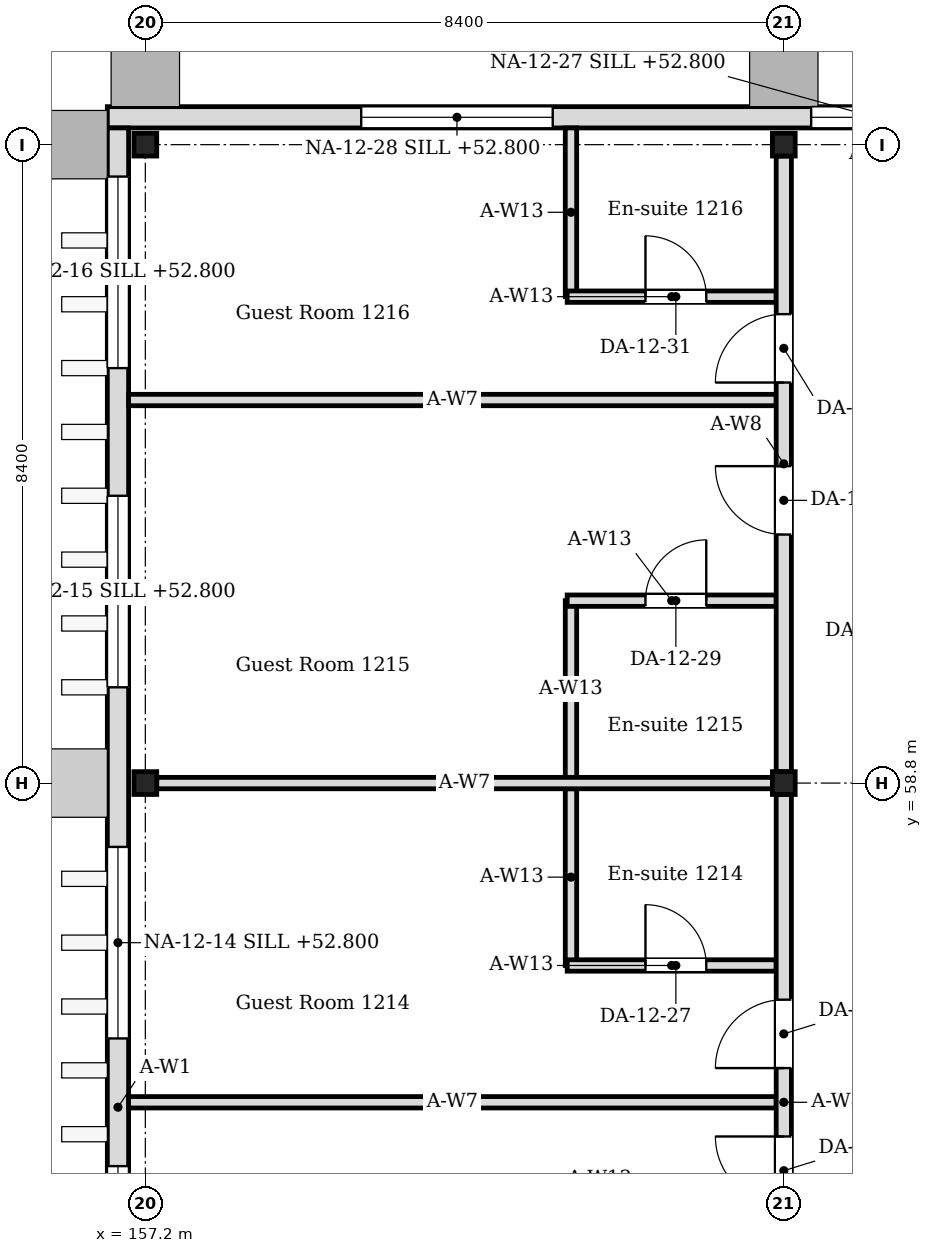
"""IFC4 building model, lengths in metres.
Left out: names, types, materials, properties, quantities, classifications, styles, units other than length and angle.
Written with IfcOpenShell. Run it as: python <this file> out.ifc"""

import sys

from ifc_helpers import new_model, si_unit, direction, frame, frame_2d, origin, origin_2d, place, context, subcontext, project, spatial, rectangle, i_section, extrude, element, fill, save


model = new_model("IFC4")
c1 = context("Model", 3, precision=1e-05, world=origin(), true_north=direction((0.0, 1.0)))
c2 = subcontext(c1, "Body", "Model", "MODEL_VIEW")
j1 = project(units=[si_unit("LENGTHUNIT", "METRE"), si_unit("PLANEANGLEUNIT", "RADIAN")], contexts=[c1])
p1 = place(None, origin())
s1 = spatial("IfcSite", under=j1, at=p1, CompositionType="ELEMENT")
p2 = place(p1, origin())
s2 = spatial("IfcBuilding", under=s1, at=p2, CompositionType="ELEMENT")
p3 = place(p2, frame((0.0, 0.0, 52.2)))
s3 = spatial("IfcBuildingStorey", under=s2, at=p3, CompositionType="ELEMENT", Elevation=52.2)
for number, where, z_axis, x_axis in (
    (1, (157.2, 58.8, 0.0), (0.0, 0.0, 1.0), (1.0, 0.0, 0.0)),
    (2, (157.2, 67.2, 0.0), (0.0, 0.0, 1.0), (1.0, 0.0, 0.0)),
    (3, (165.6, 58.8, 0.0), (0.0, 0.0, 1.0), (1.0, 0.0, 0.0)),
    (4, (165.6, 67.2, 0.0), (0.0, 0.0, 1.0), (1.0, 0.0, 0.0)),
):
    element("IfcColumn", number, at=place(p3, frame(where, z_axis=z_axis, x_axis=x_axis)), inside=s3, PredefinedType="COLUMN", context=c2, shape_type="SweptSolid", body=[
        extrude(i_section(OverallWidth=0.3, OverallDepth=0.3, WebThickness=0.01, FlangeThickness=0.015, FilletRadius=0.013, at=origin_2d()), origin(), (0.0, 0.0, 1.0), 4.2),
    ])
p4 = place(p3, frame((156.84, 41.65, 0.0), z_axis=(0.0, 0.0, 1.0), x_axis=(0.0, 1.0, 0.0)))
e5 = element("IfcWall", 5, at=p4, inside=s3, PredefinedType="SOLIDWALL", context=c2, shape_type="SweptSolid", body=[
    extrude(rectangle(XDim=25.77, YDim=0.28, at=frame_2d((12.885, 0.0))), origin(), (0.0, 0.0, 1.0), 4.05),
])
p5 = place(p4, frame((1.61, 0.0, 0.6)))
e6 = element("IfcOpeningElement", 6, at=p5, cuts=e5, PredefinedType="OPENING", context=c2, shape_type="SweptSolid", body=[
    extrude(rectangle(XDim=2.52, YDim=2.4, at=frame_2d((1.26, 1.2))), frame((0.0, 0.15, 0.0), z_axis=(0.0, -1.0, 0.0), x_axis=(1.0, 0.0, 0.0)), (0.0, 0.0, 1.0), 0.3),
])
p6 = place(p4, frame((5.81, 0.0, 0.6)))
e7 = element("IfcOpeningElement", 7, at=p6, cuts=e5, PredefinedType="OPENING", context=c2, shape_type="SweptSolid", body=[
    extrude(rectangle(XDim=2.52, YDim=2.4, at=frame_2d((1.26, 1.2))), frame((0.0, 0.15, 0.0), z_axis=(0.0, -1.0, 0.0), x_axis=(1.0, 0.0, 0.0)), (0.0, 0.0, 1.0), 0.3),
])
p7 = place(p4, frame((9.59, 0.0, 0.6)))
e8 = element("IfcOpeningElement", 8, at=p7, cuts=e5, PredefinedType="OPENING", context=c2, shape_type="SweptSolid", body=[
    extrude(rectangle(XDim=2.52, YDim=2.4, at=frame_2d((1.26, 1.2))), frame((0.0, 0.15, 0.0), z_axis=(0.0, -1.0, 0.0), x_axis=(1.0, 0.0, 0.0)), (0.0, 0.0, 1.0), 0.3),
])
p8 = place(p4, frame((13.79, 0.0, 0.6)))
e9 = element("IfcOpeningElement", 9, at=p8, cuts=e5, PredefinedType="OPENING", context=c2, shape_type="SweptSolid", body=[
    extrude(rectangle(XDim=2.52, YDim=2.4, at=frame_2d((1.26, 1.2))), frame((0.0, 0.15, 0.0), z_axis=(0.0, -1.0, 0.0), x_axis=(1.0, 0.0, 0.0)), (0.0, 0.0, 1.0), 0.3),
])
p9 = place(p4, frame((18.41, 0.0, 0.6)))
e10 = element("IfcOpeningElement", 10, at=p9, cuts=e5, PredefinedType="OPENING", context=c2, shape_type="SweptSolid", body=[
    extrude(rectangle(XDim=2.52, YDim=2.4, at=frame_2d((1.26, 1.2))), frame((0.0, 0.15, 0.0), z_axis=(0.0, -1.0, 0.0), x_axis=(1.0, 0.0, 0.0)), (0.0, 0.0, 1.0), 0.3),
])
p10 = place(p4, frame((22.61, 0.0, 0.6)))
e11 = element("IfcOpeningElement", 11, at=p10, cuts=e5, PredefinedType="OPENING", context=c2, shape_type="SweptSolid", body=[
    extrude(rectangle(XDim=2.52, YDim=2.4, at=frame_2d((1.26, 1.2))), frame((0.0, 0.15, 0.0), z_axis=(0.0, -1.0, 0.0), x_axis=(1.0, 0.0, 0.0)), (0.0, 0.0, 1.0), 0.3),
])
p11 = place(p3, frame((156.7, 67.56, 0.0), z_axis=(0.0, 0.0, 1.0), x_axis=(1.0, 0.0, 0.0)))
e12 = element("IfcWall", 12, at=p11, inside=s3, PredefinedType="SOLIDWALL", context=c2, shape_type="SweptSolid", body=[
    extrude(rectangle(XDim=20.2, YDim=0.28, at=frame_2d((10.1, 0.0))), origin(), (0.0, 0.0, 1.0), 4.05),
])
p12 = place(p11, frame((9.26, 0.0, 0.6)))
e13 = element("IfcOpeningElement", 13, at=p12, cuts=e12, PredefinedType="OPENING", context=c2, shape_type="SweptSolid", body=[
    extrude(rectangle(XDim=1.68, YDim=2.4, at=frame_2d((0.84, 1.2))), frame((0.0, 0.15, 0.0), z_axis=(0.0, -1.0, 0.0), x_axis=(1.0, 0.0, 0.0)), (0.0, 0.0, 1.0), 0.3),
])
p13 = place(p11, frame((3.34, 0.0, 0.6)))
e14 = element("IfcOpeningElement", 14, at=p13, cuts=e12, PredefinedType="OPENING", context=c2, shape_type="SweptSolid", body=[
    extrude(rectangle(XDim=2.52, YDim=2.4, at=frame_2d((1.26, 1.2))), frame((0.0, 0.15, 0.0), z_axis=(0.0, -1.0, 0.0), x_axis=(1.0, 0.0, 0.0)), (0.0, 0.0, 1.0), 0.3),
])
p14 = place(p3, frame((162.8, 56.4, 0.0), z_axis=(0.0, 0.0, 1.0), x_axis=(0.0, 1.0, 0.0)))
e15 = element("IfcWall", 15, at=p14, inside=s3, PredefinedType="PARTITIONING", context=c2, shape_type="SweptSolid", body=[
    extrude(rectangle(XDim=2.325, YDim=0.15, at=frame_2d((1.163, 0.0))), origin(), (0.0, 0.0, 1.0), 4.05),
])
p15 = place(p3, frame((162.75, 56.4, 0.0), z_axis=(0.0, 0.0, 1.0), x_axis=(1.0, 0.0, 0.0)))
e16 = element("IfcWall", 16, at=p15, inside=s3, PredefinedType="PARTITIONING", context=c2, shape_type="SweptSolid", body=[
    extrude(rectangle(XDim=2.75, YDim=0.15, at=frame_2d((1.375, 0.0))), origin(), (0.0, 0.0, 1.0), 4.05),
])
p16 = place(p15, frame((1.03, 0.0, 0.0)))
e17 = element("IfcOpeningElement", 17, at=p16, cuts=e16, PredefinedType="OPENING", context=c2, shape_type="SweptSolid", body=[
    extrude(rectangle(XDim=0.8, YDim=2.1, at=frame_2d((0.4, 1.05))), frame((0.0, 0.085, 0.0), z_axis=(0.0, -1.0, 0.0), x_axis=(1.0, 0.0, 0.0)), (0.0, 0.0, 1.0), 0.17),
])
p17 = place(p3, frame((162.8, 58.875, 0.0), z_axis=(0.0, 0.0, 1.0), x_axis=(0.0, 1.0, 0.0)))
e18 = element("IfcWall", 18, at=p17, inside=s3, PredefinedType="PARTITIONING", context=c2, shape_type="SweptSolid", body=[
    extrude(rectangle(XDim=2.325, YDim=0.15, at=frame_2d((1.163, 0.0))), origin(), (0.0, 0.0, 1.0), 4.05),
])
p18 = place(p3, frame((162.75, 61.2, 0.0), z_axis=(0.0, 0.0, 1.0), x_axis=(1.0, 0.0, 0.0)))
e19 = element("IfcWall", 19, at=p18, inside=s3, PredefinedType="PARTITIONING", context=c2, shape_type="SweptSolid", body=[
    extrude(rectangle(XDim=2.75, YDim=0.15, at=frame_2d((1.375, 0.0))), origin(), (0.0, 0.0, 1.0), 4.05),
])
p19 = place(p18, frame((1.03, 0.0, 0.0)))
e20 = element("IfcOpeningElement", 20, at=p19, cuts=e19, PredefinedType="OPENING", context=c2, shape_type="SweptSolid", body=[
    extrude(rectangle(XDim=0.8, YDim=2.1, at=frame_2d((0.4, 1.05))), frame((0.0, 0.085, 0.0), z_axis=(0.0, -1.0, 0.0), x_axis=(1.0, 0.0, 0.0)), (0.0, 0.0, 1.0), 0.17),
])
p20 = place(p3, frame((162.8, 65.2, 0.0), z_axis=(0.0, 0.0, 1.0), x_axis=(0.0, 1.0, 0.0)))
e21 = element("IfcWall", 21, at=p20, inside=s3, PredefinedType="PARTITIONING", context=c2, shape_type="SweptSolid", body=[
    extrude(rectangle(XDim=2.22, YDim=0.15, at=frame_2d((1.11, 0.0))), origin(), (0.0, 0.0, 1.0), 4.05),
])
p21 = place(p3, frame((162.75, 65.2, 0.0), z_axis=(0.0, 0.0, 1.0), x_axis=(1.0, 0.0, 0.0)))
e22 = element("IfcWall", 22, at=p21, inside=s3, PredefinedType="PARTITIONING", context=c2, shape_type="SweptSolid", body=[
    extrude(rectangle(XDim=2.75, YDim=0.15, at=frame_2d((1.375, 0.0))), origin(), (0.0, 0.0, 1.0), 4.05),
])
p22 = place(p21, frame((1.03, 0.0, 0.0)))
e23 = element("IfcOpeningElement", 23, at=p22, cuts=e22, PredefinedType="OPENING", context=c2, shape_type="SweptSolid", body=[
    extrude(rectangle(XDim=0.8, YDim=2.1, at=frame_2d((0.4, 1.05))), frame((0.0, 0.085, 0.0), z_axis=(0.0, -1.0, 0.0), x_axis=(1.0, 0.0, 0.0)), (0.0, 0.0, 1.0), 0.17),
])
p23 = place(p3, frame((157.35, 58.8, 0.0), z_axis=(0.0, 0.0, 1.0), x_axis=(1.0, 0.0, 0.0)))
e24 = element("IfcWall", 24, at=p23, inside=s3, PredefinedType="PARTITIONING", context=c2, shape_type="SweptSolid", body=[
    extrude(rectangle(XDim=8.1, YDim=0.15, at=frame_2d((4.05, 0.0))), origin(), (0.0, 0.0, 1.0), 3.604),
])
for number, where, z_axis, x_axis in (
    (25, (156.98, 54.6, 0.0), (0.0, 0.0, 1.0), (1.0, 0.0, 0.0)),
    (26, (156.98, 63.84, 0.0), (0.0, 0.0, 1.0), (1.0, 0.0, 0.0)),
):
    element("IfcWall", number, at=place(p3, frame(where, z_axis=z_axis, x_axis=x_axis)), inside=s3, PredefinedType="PARTITIONING", context=c2, shape_type="SweptSolid", body=[
        extrude(rectangle(XDim=8.52, YDim=0.15, at=frame_2d((4.26, 0.0))), origin(), (0.0, 0.0, 1.0), 3.604),
    ])
p24 = place(p3, frame((165.6, 50.55, 0.0), z_axis=(0.0, 0.0, 1.0), x_axis=(0.0, 1.0, 0.0)))
e27 = element("IfcWall", 27, at=p24, inside=s3, PredefinedType="PARTITIONING", context=c2, shape_type="SweptSolid", body=[
    extrude(rectangle(XDim=8.1, YDim=0.2, at=frame_2d((4.05, 0.0))), origin(), (0.0, 0.0, 1.0), 3.45),
])
p25 = place(p24, frame((2.7, 0.0, 0.0)))
e28 = element("IfcOpeningElement", 28, at=p25, cuts=e27, PredefinedType="OPENING", context=c2, shape_type="SweptSolid", body=[
    extrude(rectangle(XDim=0.9, YDim=2.1, at=frame_2d((0.45, 1.05))), frame((0.0, 0.11, 0.0), z_axis=(0.0, -1.0, 0.0), x_axis=(1.0, 0.0, 0.0)), (0.0, 0.0, 1.0), 0.22),
])
p26 = place(p24, frame((4.5, 0.0, 0.0)))
e29 = element("IfcOpeningElement", 29, at=p26, cuts=e27, PredefinedType="OPENING", context=c2, shape_type="SweptSolid", body=[
    extrude(rectangle(XDim=0.9, YDim=2.1, at=frame_2d((0.45, 1.05))), frame((0.0, 0.11, 0.0), z_axis=(0.0, -1.0, 0.0), x_axis=(1.0, 0.0, 0.0)), (0.0, 0.0, 1.0), 0.22),
])
p27 = place(p3, frame((165.6, 58.95, 0.0), z_axis=(0.0, 0.0, 1.0), x_axis=(0.0, 1.0, 0.0)))
e30 = element("IfcWall", 30, at=p27, inside=s3, PredefinedType="PARTITIONING", context=c2, shape_type="SweptSolid", body=[
    extrude(rectangle(XDim=8.1, YDim=0.2, at=frame_2d((4.05, 0.0))), origin(), (0.0, 0.0, 1.0), 3.45),
])
p28 = place(p27, frame((3.12, 0.0, 0.0)))
e31 = element("IfcOpeningElement", 31, at=p28, cuts=e30, PredefinedType="OPENING", context=c2, shape_type="SweptSolid", body=[
    extrude(rectangle(XDim=0.9, YDim=2.1, at=frame_2d((0.45, 1.05))), frame((0.0, 0.11, 0.0), z_axis=(0.0, -1.0, 0.0), x_axis=(1.0, 0.0, 0.0)), (0.0, 0.0, 1.0), 0.22),
])
p29 = place(p27, frame((5.12, 0.0, 0.0)))
e32 = element("IfcOpeningElement", 32, at=p29, cuts=e30, PredefinedType="OPENING", context=c2, shape_type="SweptSolid", body=[
    extrude(rectangle(XDim=0.9, YDim=2.1, at=frame_2d((0.45, 1.05))), frame((0.0, 0.11, 0.0), z_axis=(0.0, -1.0, 0.0), x_axis=(1.0, 0.0, 0.0)), (0.0, 0.0, 1.0), 0.22),
])
p30 = place(p7, origin())
e33 = element("IfcWindow", 33, at=p30, inside=s3, PartitioningType="SINGLE_PANEL", PredefinedType="WINDOW", context=c2, shape_type="SweptSolid", body=[
    extrude(rectangle(XDim=2.52, YDim=2.4, at=frame_2d((1.26, 1.2))), frame((0.0, 0.03, 0.0), z_axis=(0.0, -1.0, 0.0), x_axis=(1.0, 0.0, 0.0)), (0.0, 0.0, 1.0), 0.06),
])
fill(e8, e33)
p31 = place(p8, origin())
e34 = element("IfcWindow", 34, at=p31, inside=s3, PartitioningType="SINGLE_PANEL", PredefinedType="WINDOW", context=c2, shape_type="SweptSolid", body=[
    extrude(rectangle(XDim=2.52, YDim=2.4, at=frame_2d((1.26, 1.2))), frame((0.0, 0.03, 0.0), z_axis=(0.0, -1.0, 0.0), x_axis=(1.0, 0.0, 0.0)), (0.0, 0.0, 1.0), 0.06),
])
fill(e9, e34)
p32 = place(p9, origin())
e35 = element("IfcWindow", 35, at=p32, inside=s3, PartitioningType="SINGLE_PANEL", PredefinedType="WINDOW", context=c2, shape_type="SweptSolid", body=[
    extrude(rectangle(XDim=2.52, YDim=2.4, at=frame_2d((1.26, 1.2))), frame((0.0, 0.03, 0.0), z_axis=(0.0, -1.0, 0.0), x_axis=(1.0, 0.0, 0.0)), (0.0, 0.0, 1.0), 0.06),
])
fill(e10, e35)
p33 = place(p10, origin())
e36 = element("IfcWindow", 36, at=p33, inside=s3, PartitioningType="SINGLE_PANEL", PredefinedType="WINDOW", context=c2, shape_type="SweptSolid", body=[
    extrude(rectangle(XDim=2.52, YDim=2.4, at=frame_2d((1.26, 1.2))), frame((0.0, 0.03, 0.0), z_axis=(0.0, -1.0, 0.0), x_axis=(1.0, 0.0, 0.0)), (0.0, 0.0, 1.0), 0.06),
])
fill(e11, e36)
p34 = place(p12, origin())
e37 = element("IfcWindow", 37, at=p34, inside=s3, PartitioningType="SINGLE_PANEL", PredefinedType="WINDOW", context=c2, shape_type="SweptSolid", body=[
    extrude(rectangle(XDim=1.68, YDim=2.4, at=frame_2d((0.84, 1.2))), frame((0.0, 0.03, 0.0), z_axis=(0.0, -1.0, 0.0), x_axis=(1.0, 0.0, 0.0)), (0.0, 0.0, 1.0), 0.06),
])
fill(e13, e37)
p35 = place(p13, origin())
e38 = element("IfcWindow", 38, at=p35, inside=s3, PartitioningType="SINGLE_PANEL", PredefinedType="WINDOW", context=c2, shape_type="SweptSolid", body=[
    extrude(rectangle(XDim=2.52, YDim=2.4, at=frame_2d((1.26, 1.2))), frame((0.0, 0.03, 0.0), z_axis=(0.0, -1.0, 0.0), x_axis=(1.0, 0.0, 0.0)), (0.0, 0.0, 1.0), 0.06),
])
fill(e14, e38)
p36 = place(p25, origin())
e39 = element("IfcDoor", 39, at=p36, inside=s3, OperationType="SINGLE_SWING_RIGHT", PredefinedType="DOOR", context=c2, shape_type="SweptSolid", body=[
    extrude(rectangle(XDim=0.9, YDim=2.1, at=frame_2d((0.45, 1.05))), frame((0.0, 0.025, 0.0), z_axis=(0.0, -1.0, 0.0), x_axis=(1.0, 0.0, 0.0)), (0.0, 0.0, 1.0), 0.05),
])
fill(e28, e39)
p37 = place(p16, origin())
e40 = element("IfcDoor", 40, at=p37, inside=s3, OperationType="SINGLE_SWING_LEFT", PredefinedType="DOOR", context=c2, shape_type="SweptSolid", body=[
    extrude(rectangle(XDim=0.8, YDim=2.1, at=frame_2d((0.4, 1.05))), frame((0.0, 0.025, 0.0), z_axis=(0.0, -1.0, 0.0), x_axis=(1.0, 0.0, 0.0)), (0.0, 0.0, 1.0), 0.05),
])
fill(e17, e40)
p38 = place(p26, origin())
e41 = element("IfcDoor", 41, at=p38, inside=s3, OperationType="SINGLE_SWING_LEFT", PredefinedType="DOOR", context=c2, shape_type="SweptSolid", body=[
    extrude(rectangle(XDim=0.9, YDim=2.1, at=frame_2d((0.45, 1.05))), frame((0.0, 0.025, 0.0), z_axis=(0.0, -1.0, 0.0), x_axis=(1.0, 0.0, 0.0)), (0.0, 0.0, 1.0), 0.05),
])
fill(e29, e41)
p39 = place(p19, origin())
e42 = element("IfcDoor", 42, at=p39, inside=s3, OperationType="SINGLE_SWING_RIGHT", PredefinedType="DOOR", context=c2, shape_type="SweptSolid", body=[
    extrude(rectangle(XDim=0.8, YDim=2.1, at=frame_2d((0.4, 1.05))), frame((0.0, 0.025, 0.0), z_axis=(0.0, -1.0, 0.0), x_axis=(1.0, 0.0, 0.0)), (0.0, 0.0, 1.0), 0.05),
])
fill(e20, e42)
p40 = place(p28, origin())
e43 = element("IfcDoor", 43, at=p40, inside=s3, OperationType="SINGLE_SWING_RIGHT", PredefinedType="DOOR", context=c2, shape_type="SweptSolid", body=[
    extrude(rectangle(XDim=0.9, YDim=2.1, at=frame_2d((0.45, 1.05))), frame((0.0, 0.025, 0.0), z_axis=(0.0, -1.0, 0.0), x_axis=(1.0, 0.0, 0.0)), (0.0, 0.0, 1.0), 0.05),
])
fill(e31, e43)
p41 = place(p22, origin())
e44 = element("IfcDoor", 44, at=p41, inside=s3, OperationType="SINGLE_SWING_LEFT", PredefinedType="DOOR", context=c2, shape_type="SweptSolid", body=[
    extrude(rectangle(XDim=0.8, YDim=2.1, at=frame_2d((0.4, 1.05))), frame((0.0, 0.025, 0.0), z_axis=(0.0, -1.0, 0.0), x_axis=(1.0, 0.0, 0.0)), (0.0, 0.0, 1.0), 0.05),
])
fill(e23, e44)
p42 = place(p29, origin())
e45 = element("IfcDoor", 45, at=p42, inside=s3, OperationType="SINGLE_SWING_LEFT", PredefinedType="DOOR", context=c2, shape_type="SweptSolid", body=[
    extrude(rectangle(XDim=0.9, YDim=2.1, at=frame_2d((0.45, 1.05))), frame((0.0, 0.025, 0.0), z_axis=(0.0, -1.0, 0.0), x_axis=(1.0, 0.0, 0.0)), (0.0, 0.0, 1.0), 0.05),
])
fill(e32, e45)
save(model, sys.argv[1])
